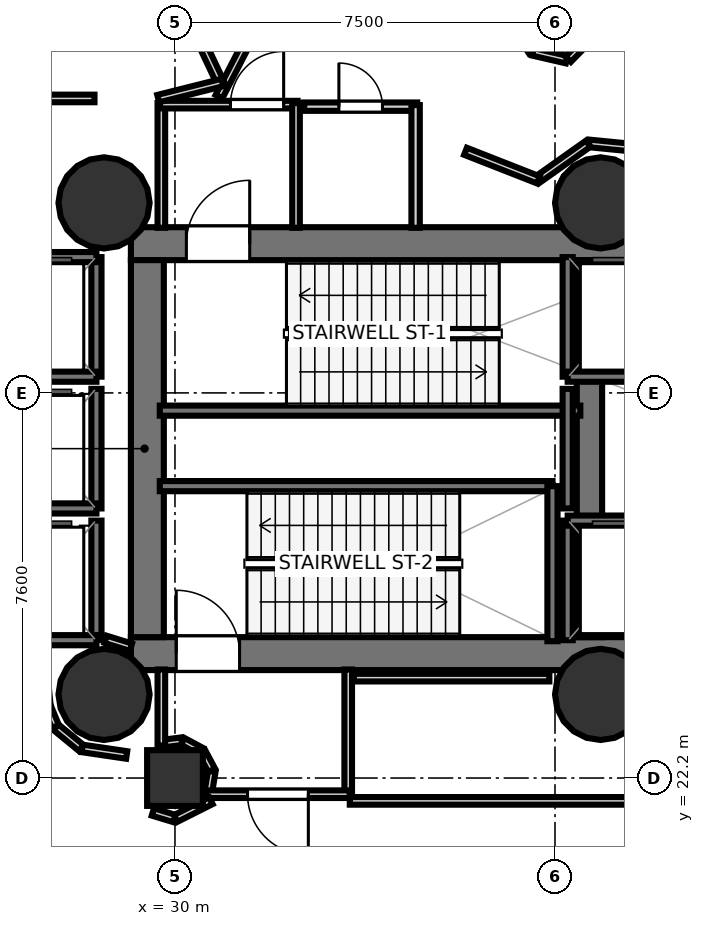
"""IFC4 building model, lengths in metres.
Left out: names, types, materials, properties, quantities, classifications, styles, units other than length and angle.
Written with IfcOpenShell. Run it as: python <this file> out.ifc"""

import sys

from ifc_helpers import new_model, si_unit, direction, frame, frame_2d, origin, origin_2d, place, context, subcontext, project, spatial, rectangle, hollow_circle, extrude, element, fill, save


model = new_model("IFC4")
c1 = context("Model", 3, precision=1e-05, world=origin(), true_north=direction((0.0, 1.0)))
c2 = subcontext(c1, "Body", "Model", "MODEL_VIEW")
j1 = project(units=[si_unit("LENGTHUNIT", "METRE"), si_unit("PLANEANGLEUNIT", "RADIAN")], contexts=[c1])
p1 = place(None, origin())
s1 = spatial("IfcSite", under=j1, at=p1, CompositionType="ELEMENT")
p2 = place(p1, origin())
s2 = spatial("IfcBuilding", under=s1, at=p2, CompositionType="ELEMENT")
p3 = place(p2, frame((0.0, 0.0, -5.6)))
s3 = spatial("IfcBuildingStorey", under=s2, at=p3, CompositionType="ELEMENT", Elevation=-5.6)
p4 = place(p3, frame((29.13, 32.745, 0.0), z_axis=(0.0, 0.0, 1.0), x_axis=(1.0, 0.0, 0.0)))
e1 = element("IfcWall", 1, at=p4, inside=s3, PredefinedType="SHEAR", context=c2, shape_type="SweptSolid", body=[
    extrude(rectangle(XDim=10.72, YDim=0.65, at=frame_2d((5.36, 0.0))), origin(), (0.0, 0.0, 1.0), 5.3),
])
p5 = place(p4, frame((1.095, 0.0, 0.0)))
e2 = element("IfcOpeningElement", 2, at=p5, cuts=e1, PredefinedType="OPENING", context=c2, shape_type="SweptSolid", body=[
    extrude(rectangle(XDim=1.25, YDim=2.15, at=frame_2d((0.625, 1.075))), frame((0.0, 0.335, 0.0), z_axis=(0.0, -1.0, 0.0), x_axis=(1.0, 0.0, 0.0)), (0.0, 0.0, 1.0), 0.67),
])
p6 = place(p3, frame((29.13, 24.655, 0.0), z_axis=(0.0, 0.0, 1.0), x_axis=(1.0, 0.0, 0.0)))
e3 = element("IfcWall", 3, at=p6, inside=s3, PredefinedType="SHEAR", context=c2, shape_type="SweptSolid", body=[
    extrude(rectangle(XDim=10.72, YDim=0.65, at=frame_2d((5.36, 0.0))), origin(), (0.0, 0.0, 1.0), 5.3),
])
p7 = place(p6, frame((0.895, 0.0, 0.0)))
e4 = element("IfcOpeningElement", 4, at=p7, cuts=e3, PredefinedType="OPENING", context=c2, shape_type="SweptSolid", body=[
    extrude(rectangle(XDim=1.25, YDim=2.15, at=frame_2d((0.625, 1.075))), frame((0.0, 0.335, 0.0), z_axis=(0.0, -1.0, 0.0), x_axis=(1.0, 0.0, 0.0)), (0.0, 0.0, 1.0), 0.67),
])
p8 = place(p3, frame((29.455, 24.98, 0.0), z_axis=(0.0, 0.0, 1.0), x_axis=(0.0, 1.0, 0.0)))
e5 = element("IfcWall", 5, at=p8, inside=s3, PredefinedType="SHEAR", context=c2, shape_type="SweptSolid", body=[
    extrude(rectangle(XDim=7.44, YDim=0.65, at=frame_2d((3.72, 0.0))), origin(), (0.0, 0.0, 1.0), 5.3),
])
p9 = place(p3, frame((38.18, 24.98, 0.0), z_axis=(0.0, 0.0, 1.0), x_axis=(0.0, 1.0, 0.0)))
e6 = element("IfcWall", 6, at=p9, inside=s3, PredefinedType="SHEAR", context=c2, shape_type="SweptSolid", body=[
    extrude(rectangle(XDim=7.44, YDim=0.5, at=frame_2d((3.72, 0.0))), origin(), (0.0, 0.0, 1.0), 5.3),
])
for number, where, z_axis, x_axis in (
    (7, (28.6, 33.55, 0.0), (0.0, 0.0, 1.0), (1.0, 0.0, 0.0)),
    (8, (28.6, 23.85, 0.0), (0.0, 0.0, 1.0), (1.0, 0.0, 0.0)),
    (9, (38.4, 33.55, 0.0), (0.0, 0.0, 1.0), (1.0, 0.0, 0.0)),
    (10, (38.4, 23.85, 0.0), (0.0, 0.0, 1.0), (1.0, 0.0, 0.0)),
):
    element("IfcColumn", number, at=place(p3, frame(where, z_axis=z_axis, x_axis=x_axis)), inside=s3, PredefinedType="COLUMN", context=c2, shape_type="SweptSolid", body=[
        extrude(hollow_circle(Radius=0.9, WallThickness=0.045, at=origin_2d()), origin(), (0.0, 0.0, 1.0), 5.6),
    ])
p10 = place(p3, frame((30.0, 22.2, 0.0), z_axis=(0.0, 0.0, 1.0), x_axis=(1.0, 0.0, 0.0)))
e11 = element("IfcColumn", 11, at=p10, inside=s3, PredefinedType="COLUMN", context=c2, shape_type="SweptSolid", body=[
    extrude(rectangle(XDim=1.1, YDim=1.1, at=origin_2d()), origin(), (0.0, 0.0, 1.0), 5.6),
])
p11 = place(p3, frame((29.7, 29.45, 0.0), z_axis=(0.0, 0.0, 1.0), x_axis=(1.0, 0.0, 0.0)))
e12 = element("IfcWall", 12, at=p11, inside=s3, PredefinedType="SOLIDWALL", context=c2, shape_type="SweptSolid", body=[
    extrude(rectangle(XDim=8.3, YDim=0.2, at=frame_2d((4.15, 0.0))), origin(), (0.0, 0.0, 1.0), 5.3),
])
p12 = place(p3, frame((29.7, 27.96, 0.0), z_axis=(0.0, 0.0, 1.0), x_axis=(1.0, 0.0, 0.0)))
e13 = element("IfcWall", 13, at=p12, inside=s3, PredefinedType="SOLIDWALL", context=c2, shape_type="SweptSolid", body=[
    extrude(rectangle(XDim=7.75, YDim=0.2, at=frame_2d((3.875, 0.0))), origin(), (0.0, 0.0, 1.0), 5.3),
])
p13 = place(p3, frame((37.45, 24.9, 0.0), z_axis=(0.0, 0.0, 1.0), x_axis=(0.0, 1.0, 0.0)))
e14 = element("IfcWall", 14, at=p13, inside=s3, PredefinedType="SOLIDWALL", context=c2, shape_type="SweptSolid", body=[
    extrude(rectangle(XDim=3.06, YDim=0.2, at=frame_2d((1.53, 0.0))), origin(), (0.0, 0.0, 1.0), 5.3),
])
p14 = place(p3, frame((37.75, 30.12, 0.0), z_axis=(0.0, 0.0, 1.0), x_axis=(0.0, 1.0, 0.0)))
e15 = element("IfcWall", 15, at=p14, inside=s3, PredefinedType="SOLIDWALL", context=c2, shape_type="SweptSolid", body=[
    extrude(rectangle(XDim=2.36, YDim=0.2, at=frame_2d((1.18, 0.0))), origin(), (0.0, 0.0, 1.0), 5.3),
])
p15 = place(p3, frame((37.75, 30.12, 0.0), z_axis=(0.0, 0.0, 1.0), x_axis=(1.0, 0.0, 0.0)))
e16 = element("IfcWall", 16, at=p15, inside=s3, PredefinedType="SOLIDWALL", context=c2, shape_type="SweptSolid", body=[
    extrude(rectangle(XDim=2.1, YDim=0.2, at=frame_2d((1.05, 0.0))), origin(), (0.0, 0.0, 1.0), 5.3),
])
p16 = place(p3, frame((37.75, 24.92, 0.0), z_axis=(0.0, 0.0, 1.0), x_axis=(0.0, 1.0, 0.0)))
e17 = element("IfcWall", 17, at=p16, inside=s3, PredefinedType="SOLIDWALL", context=c2, shape_type="SweptSolid", body=[
    extrude(rectangle(XDim=2.36, YDim=0.2, at=frame_2d((1.18, 0.0))), origin(), (0.0, 0.0, 1.0), 5.3),
])
p17 = place(p3, frame((37.75, 27.28, 0.0), z_axis=(0.0, 0.0, 1.0), x_axis=(1.0, 0.0, 0.0)))
e18 = element("IfcWall", 18, at=p17, inside=s3, PredefinedType="SOLIDWALL", context=c2, shape_type="SweptSolid", body=[
    extrude(rectangle(XDim=2.1, YDim=0.2, at=frame_2d((1.05, 0.0))), origin(), (0.0, 0.0, 1.0), 5.3),
])
p18 = place(p3, frame((28.45, 30.12, 0.0), z_axis=(0.0, 0.0, 1.0), x_axis=(0.0, 1.0, 0.0)))
e19 = element("IfcWall", 19, at=p18, inside=s3, PredefinedType="SOLIDWALL", context=c2, shape_type="SweptSolid", body=[
    extrude(rectangle(XDim=2.36, YDim=0.2, at=frame_2d((1.18, 0.0))), origin(), (0.0, 0.0, 1.0), 5.3),
])
for number, where, z_axis, x_axis in (
    (20, (26.35, 32.48, 0.0), (0.0, 0.0, 1.0), (1.0, 0.0, 0.0)),
    (21, (26.35, 30.12, 0.0), (0.0, 0.0, 1.0), (1.0, 0.0, 0.0)),
):
    element("IfcWall", number, at=place(p3, frame(where, z_axis=z_axis, x_axis=x_axis)), inside=s3, PredefinedType="SOLIDWALL", context=c2, shape_type="SweptSolid", body=[
        extrude(rectangle(XDim=2.1, YDim=0.2, at=frame_2d((1.05, 0.0))), origin(), (0.0, 0.0, 1.0), 5.3),
    ])
p19 = place(p3, frame((28.45, 27.52, 0.0), z_axis=(0.0, 0.0, 1.0), x_axis=(0.0, 1.0, 0.0)))
e22 = element("IfcWall", 22, at=p19, inside=s3, PredefinedType="SOLIDWALL", context=c2, shape_type="SweptSolid", body=[
    extrude(rectangle(XDim=2.36, YDim=0.2, at=frame_2d((1.18, 0.0))), origin(), (0.0, 0.0, 1.0), 5.3),
])
p20 = place(p3, frame((26.35, 27.52, 0.0), z_axis=(0.0, 0.0, 1.0), x_axis=(1.0, 0.0, 0.0)))
e23 = element("IfcWall", 23, at=p20, inside=s3, PredefinedType="SOLIDWALL", context=c2, shape_type="SweptSolid", body=[
    extrude(rectangle(XDim=2.1, YDim=0.2, at=frame_2d((1.05, 0.0))), origin(), (0.0, 0.0, 1.0), 5.3),
])
p21 = place(p3, frame((28.45, 24.92, 0.0), z_axis=(0.0, 0.0, 1.0), x_axis=(0.0, 1.0, 0.0)))
e24 = element("IfcWall", 24, at=p21, inside=s3, PredefinedType="SOLIDWALL", context=c2, shape_type="SweptSolid", body=[
    extrude(rectangle(XDim=2.36, YDim=0.2, at=frame_2d((1.18, 0.0))), origin(), (0.0, 0.0, 1.0), 5.3),
])
p22 = place(p3, frame((26.35, 24.92, 0.0), z_axis=(0.0, 0.0, 1.0), x_axis=(1.0, 0.0, 0.0)))
e25 = element("IfcWall", 25, at=p22, inside=s3, PredefinedType="SOLIDWALL", context=c2, shape_type="SweptSolid", body=[
    extrude(rectangle(XDim=2.1, YDim=0.2, at=frame_2d((1.05, 0.0))), origin(), (0.0, 0.0, 1.0), 5.3),
])
p23 = place(p3, frame((37.75, 27.52, 0.0), z_axis=(0.0, 0.0, 1.0), x_axis=(0.0, 1.0, 0.0)))
e26 = element("IfcWall", 26, at=p23, inside=s3, PredefinedType="SOLIDWALL", context=c2, shape_type="SweptSolid", body=[
    extrude(rectangle(XDim=2.36, YDim=0.2, at=frame_2d((1.18, 0.0))), origin(), (0.0, 0.0, 1.0), 5.3),
])
p24 = place(p3, frame((29.731, 33.058, 0.0), z_axis=(0.0, 0.0, 1.0), x_axis=(0.0, 1.0, 0.0)))
e27 = element("IfcWall", 27, at=p24, inside=s3, PredefinedType="PARTITIONING", context=c2, shape_type="SweptSolid", body=[
    extrude(rectangle(XDim=2.462, YDim=0.15, at=frame_2d((1.231, 0.0))), origin(), (0.0, 0.0, 1.0), 4.62),
])
p25 = place(p3, frame((29.7, 35.489, 0.0), z_axis=(0.0, 0.0, 1.0), x_axis=(1.0, 0.0, 0.0)))
e28 = element("IfcWall", 28, at=p25, inside=s3, PredefinedType="PARTITIONING", context=c2, shape_type="SweptSolid", body=[
    extrude(rectangle(XDim=2.72, YDim=0.15, at=frame_2d((1.36, 0.0))), origin(), (0.0, 0.0, 1.0), 4.62),
])
p26 = place(p25, frame((1.395, 0.0, 0.0)))
e29 = element("IfcOpeningElement", 29, at=p26, cuts=e28, PredefinedType="OPENING", context=c2, shape_type="SweptSolid", body=[
    extrude(rectangle(XDim=1.05, YDim=2.15, at=frame_2d((0.525, 1.075))), frame((0.0, 0.085, 0.0), z_axis=(0.0, -1.0, 0.0), x_axis=(1.0, 0.0, 0.0)), (0.0, 0.0, 1.0), 0.17),
])
p27 = place(p3, frame((32.389, 35.52, 0.0), z_axis=(0.0, 0.0, 1.0), x_axis=(0.0, -1.0, 0.0)))
e30 = element("IfcWall", 30, at=p27, inside=s3, PredefinedType="PARTITIONING", context=c2, shape_type="SweptSolid", body=[
    extrude(rectangle(XDim=2.462, YDim=0.15, at=frame_2d((1.231, 0.0))), origin(), (0.0, 0.0, 1.0), 4.62),
])
p28 = place(p3, frame((30.645, 21.845, 0.0), z_axis=(0.0, 0.0, 1.0), x_axis=(0.16559769087, 0.986193391165, 0.0)))
e31 = element("IfcWall", 31, at=p28, inside=s3, PredefinedType="PARTITIONING", context=c2, shape_type="SweptSolid", body=[
    extrude(rectangle(XDim=0.495, YDim=0.15, at=frame_2d((0.248, 0.0))), origin(), (0.0, 0.0, 1.0), 4.478),
])
p29 = place(p3, frame((30.724, 22.353, 0.0), z_axis=(0.0, 0.0, 1.0), x_axis=(-0.471202615726, 0.882024996773, 0.0)))
e32 = element("IfcWall", 32, at=p29, inside=s3, PredefinedType="PARTITIONING", context=c2, shape_type="SweptSolid", body=[
    extrude(rectangle(XDim=0.412, YDim=0.15, at=frame_2d((0.206, 0.0))), origin(), (0.0, 0.0, 1.0), 4.478),
])
p30 = place(p3, frame((30.517, 22.729, 0.0), z_axis=(0.0, 0.0, 1.0), x_axis=(-0.882139655073, 0.470987928665, 0.0)))
e33 = element("IfcWall", 33, at=p30, inside=s3, PredefinedType="PARTITIONING", context=c2, shape_type="SweptSolid", body=[
    extrude(rectangle(XDim=0.412, YDim=0.15, at=frame_2d((0.206, 0.0))), origin(), (0.0, 0.0, 1.0), 4.62),
])
p31 = place(p3, frame((30.135, 22.927, 0.0), z_axis=(0.0, 0.0, 1.0), x_axis=(-0.992106976416, -0.125394367286, 0.0)))
e34 = element("IfcWall", 34, at=p31, inside=s3, PredefinedType="PARTITIONING", context=c2, shape_type="SweptSolid", body=[
    extrude(rectangle(XDim=0.442, YDim=0.15, at=frame_2d((0.221, 0.0))), origin(), (0.0, 0.0, 1.0), 4.62),
])
p32 = place(p3, frame((29.731, 22.841, 0.0), z_axis=(0.0, 0.0, 1.0), x_axis=(0.0, 1.0, 0.0)))
e35 = element("IfcWall", 35, at=p32, inside=s3, PredefinedType="PARTITIONING", context=c2, shape_type="SweptSolid", body=[
    extrude(rectangle(XDim=1.501, YDim=0.15, at=frame_2d((0.75, 0.0))), origin(), (0.0, 0.0, 1.0), 4.62),
])
p33 = place(p3, frame((33.419, 24.342, 0.0), z_axis=(0.0, 0.0, 1.0), x_axis=(0.0, -1.0, 0.0)))
e36 = element("IfcWall", 36, at=p33, inside=s3, PredefinedType="PARTITIONING", context=c2, shape_type="SweptSolid", body=[
    extrude(rectangle(XDim=2.492, YDim=0.15, at=frame_2d((1.246, 0.0))), origin(), (0.0, 0.0, 1.0), 4.478),
])
p34 = place(p3, frame((33.45, 21.881, 0.0), z_axis=(0.0, 0.0, 1.0), x_axis=(-1.0, 0.0, 0.0)))
e37 = element("IfcWall", 37, at=p34, inside=s3, PredefinedType="PARTITIONING", context=c2, shape_type="SweptSolid", body=[
    extrude(rectangle(XDim=2.836, YDim=0.15, at=frame_2d((1.418, 0.0))), origin(), (0.0, 0.0, 1.0), 4.62),
])
p35 = place(p34, frame((0.818, 0.0, 0.0)))
e38 = element("IfcOpeningElement", 38, at=p35, cuts=e37, PredefinedType="OPENING", context=c2, shape_type="SweptSolid", body=[
    extrude(rectangle(XDim=1.2, YDim=2.15, at=frame_2d((0.6, 1.075))), frame((0.0, 0.085, 0.0), z_axis=(0.0, -1.0, 0.0), x_axis=(1.0, 0.0, 0.0)), (0.0, 0.0, 1.0), 0.17),
])
p36 = place(p3, frame((32.55, 35.449, 0.0), z_axis=(0.0, 0.0, 1.0), x_axis=(1.0, 0.0, 0.0)))
e39 = element("IfcWall", 39, at=p36, inside=s3, PredefinedType="PLUMBINGWALL", context=c2, shape_type="SweptSolid", body=[
    extrude(rectangle(XDim=2.23, YDim=0.165, at=frame_2d((1.115, 0.0))), origin(), (0.0, 0.0, 1.0), 4.62),
])
p37 = place(p36, frame((0.685, 0.0, 0.0)))
e40 = element("IfcOpeningElement", 40, at=p37, cuts=e39, PredefinedType="OPENING", context=c2, shape_type="SweptSolid", body=[
    extrude(rectangle(XDim=0.86, YDim=2.05, at=frame_2d((0.43, 1.025))), frame((0.0, 0.093, 0.0), z_axis=(0.0, -1.0, 0.0), x_axis=(1.0, 0.0, 0.0)), (0.0, 0.0, 1.0), 0.185),
])
p38 = place(p3, frame((34.749, 35.48, 0.0), z_axis=(0.0, 0.0, 1.0), x_axis=(0.0, -1.0, 0.0)))
e41 = element("IfcWall", 41, at=p38, inside=s3, PredefinedType="PLUMBINGWALL", context=c2, shape_type="SweptSolid", body=[
    extrude(rectangle(XDim=2.422, YDim=0.165, at=frame_2d((1.211, 0.0))), origin(), (0.0, 0.0, 1.0), 4.62),
])
p39 = place(p3, frame((29.13, 24.782, 0.0), z_axis=(0.0, 0.0, 1.0), x_axis=(-0.955000482512, 0.296604245422, 0.0)))
e42 = element("IfcWall", 42, at=p39, inside=s3, PredefinedType="PARTITIONING", context=c2, shape_type="SweptSolid", body=[
    extrude(rectangle(XDim=0.524, YDim=0.15, at=frame_2d((0.262, 0.0))), origin(), (0.0, 0.0, 1.0), 4.62),
])
p40 = place(p3, frame((37.389, 24.181, 0.0), z_axis=(0.0, 0.0, 1.0), x_axis=(-1.0, 0.0, 0.0)))
e43 = element("IfcWall", 43, at=p40, inside=s3, PredefinedType="PARTITIONING", context=c2, shape_type="SweptSolid", body=[
    extrude(rectangle(XDim=3.859, YDim=0.15, at=frame_2d((1.929, 0.0))), origin(), (0.0, 0.0, 1.0), 4.62),
])
p41 = place(p3, frame((36.719, 37.033, 0.0), z_axis=(0.0, 0.0, 1.0), x_axis=(0.555369021078, -0.831604022613, 0.0)))
e44 = element("IfcWall", 44, at=p41, inside=s3, PredefinedType="PARTITIONING", context=c2, shape_type="SweptSolid", body=[
    extrude(rectangle(XDim=0.59, YDim=0.15, at=frame_2d((0.295, 0.0))), origin(), (0.0, 0.0, 1.0), 4.62),
])
p42 = place(p3, frame((37.065, 36.53, 0.0), z_axis=(0.0, 0.0, 1.0), x_axis=(0.974571578147, -0.224076413457, 0.0)))
e45 = element("IfcWall", 45, at=p42, inside=s3, PredefinedType="PARTITIONING", context=c2, shape_type="SweptSolid", body=[
    extrude(rectangle(XDim=0.683, YDim=0.15, at=frame_2d((0.342, 0.0))), origin(), (0.0, 0.0, 1.0), 4.62),
])
p43 = place(p3, frame((37.76, 36.385, 0.0), z_axis=(0.0, 0.0, 1.0), x_axis=(0.700866130058, 0.713292834492, 0.0)))
e46 = element("IfcWall", 46, at=p43, inside=s3, PredefinedType="PARTITIONING", context=c2, shape_type="SweptSolid", body=[
    extrude(rectangle(XDim=0.884, YDim=0.15, at=frame_2d((0.442, 0.0))), origin(), (0.0, 0.0, 1.0), 4.62),
])
p44 = place(p3, frame((39.676, 34.575, 0.0), z_axis=(0.0, 0.0, 1.0), x_axis=(-0.995186799139, 0.097996095944, 0.0)))
e47 = element("IfcWall", 47, at=p44, inside=s3, PredefinedType="PARTITIONING", context=c2, shape_type="SweptSolid", body=[
    extrude(rectangle(XDim=1.507, YDim=0.15, at=frame_2d((0.754, 0.0))), origin(), (0.0, 0.0, 1.0), 4.62),
])
p45 = place(p3, frame((38.155, 34.718, 0.0), z_axis=(0.0, 0.0, 1.0), x_axis=(-0.815749774427, -0.578404966717, 0.0)))
e48 = element("IfcWall", 48, at=p45, inside=s3, PredefinedType="PARTITIONING", context=c2, shape_type="SweptSolid", body=[
    extrude(rectangle(XDim=1.24, YDim=0.15, at=frame_2d((0.62, 0.0))), origin(), (0.0, 0.0, 1.0), 4.62),
])
p46 = place(p3, frame((37.172, 34.004, 0.0), z_axis=(0.0, 0.0, 1.0), x_axis=(-0.930972145639, 0.36509021357, 0.0)))
e49 = element("IfcWall", 49, at=p46, inside=s3, PredefinedType="PARTITIONING", context=c2, shape_type="SweptSolid", body=[
    extrude(rectangle(XDim=1.545, YDim=0.15, at=frame_2d((0.773, 0.0))), origin(), (0.0, 0.0, 1.0), 4.62),
])
p47 = place(p3, frame((30.868, 35.646, 0.0), z_axis=(0.0, 0.0, 1.0), x_axis=(0.457713605207, 0.889099688229, 0.0)))
e50 = element("IfcWall", 50, at=p47, inside=s3, PredefinedType="PARTITIONING", context=c2, shape_type="SweptSolid", body=[
    extrude(rectangle(XDim=1.901, YDim=0.15, at=frame_2d((0.951, 0.0))), origin(), (0.0, 0.0, 1.0), 4.62),
])
p48 = place(p3, frame((30.157, 37.487, 0.0), z_axis=(0.0, 0.0, 1.0), x_axis=(0.427353044203, -0.904084827663, 0.0)))
e51 = element("IfcWall", 51, at=p48, inside=s3, PredefinedType="PARTITIONING", context=c2, shape_type="SweptSolid", body=[
    extrude(rectangle(XDim=1.775, YDim=0.15, at=frame_2d((0.887, 0.0))), origin(), (0.0, 0.0, 1.0), 4.62),
])
p49 = place(p3, frame((30.937, 35.926, 0.0), z_axis=(0.0, 0.0, 1.0), x_axis=(-0.969933389944, -0.243370538628, 0.0)))
e52 = element("IfcWall", 52, at=p49, inside=s3, PredefinedType="PARTITIONING", context=c2, shape_type="SweptSolid", body=[
    extrude(rectangle(XDim=1.307, YDim=0.15, at=frame_2d((0.654, 0.0))), origin(), (0.0, 0.0, 1.0), 4.62),
])
p50 = place(p3, frame((28.411, 35.611, 0.0), z_axis=(0.0, 0.0, 1.0), x_axis=(-1.0, 0.0, 0.0)))
e53 = element("IfcWall", 53, at=p50, inside=s3, PredefinedType="PARTITIONING", context=c2, shape_type="SweptSolid", body=[
    extrude(rectangle(XDim=1.861, YDim=0.15, at=frame_2d((0.931, 0.0))), origin(), (0.0, 0.0, 1.0), 4.62),
])
p51 = place(p3, frame((27.473, 23.62, 0.0), z_axis=(0.0, 0.0, 1.0), x_axis=(0.382631351728, -0.923901103298, 0.0)))
e54 = element("IfcWall", 54, at=p51, inside=s3, PredefinedType="PARTITIONING", context=c2, shape_type="SweptSolid", body=[
    extrude(rectangle(XDim=0.437, YDim=0.15, at=frame_2d((0.219, 0.0))), origin(), (0.0, 0.0, 1.0), 4.62),
])
p52 = place(p3, frame((27.649, 23.204, 0.0), z_axis=(0.0, 0.0, 1.0), x_axis=(0.772818338666, -0.634627304346, 0.0)))
e55 = element("IfcWall", 55, at=p52, inside=s3, PredefinedType="PARTITIONING", context=c2, shape_type="SweptSolid", body=[
    extrude(rectangle(XDim=0.65, YDim=0.15, at=frame_2d((0.325, 0.0))), origin(), (0.0, 0.0, 1.0), 4.62),
])
p53 = place(p3, frame((28.167, 22.785, 0.0), z_axis=(0.0, 0.0, 1.0), x_axis=(0.989291662385, -0.145952069991, 0.0)))
e56 = element("IfcWall", 56, at=p53, inside=s3, PredefinedType="PARTITIONING", context=c2, shape_type="SweptSolid", body=[
    extrude(rectangle(XDim=0.89, YDim=0.15, at=frame_2d((0.445, 0.0))), origin(), (0.0, 0.0, 1.0), 4.62),
])
p54 = place(p3, frame((29.563, 21.53, 0.0), z_axis=(0.0, 0.0, 1.0), x_axis=(0.957010621041, -0.290052876583, 0.0)))
e57 = element("IfcWall", 57, at=p54, inside=s3, PredefinedType="PARTITIONING", context=c2, shape_type="SweptSolid", body=[
    extrude(rectangle(XDim=0.447, YDim=0.15, at=frame_2d((0.224, 0.0))), origin(), (0.0, 0.0, 1.0), 4.62),
])
p55 = place(p3, frame((30.014, 21.402, 0.0), z_axis=(0.0, 0.0, 1.0), x_axis=(0.893548213857, 0.448967247706, 0.0)))
e58 = element("IfcWall", 58, at=p55, inside=s3, PredefinedType="PARTITIONING", context=c2, shape_type="SweptSolid", body=[
    extrude(rectangle(XDim=0.779, YDim=0.15, at=frame_2d((0.39, 0.0))), origin(), (0.0, 0.0, 1.0), 4.62),
])
p56 = place(p3, frame((33.45, 21.749, 0.0), z_axis=(0.0, 0.0, 1.0), x_axis=(1.0, 0.0, 0.0)))
e59 = element("IfcWall", 59, at=p56, inside=s3, PredefinedType="PARTITIONING", context=c2, shape_type="SweptSolid", body=[
    extrude(rectangle(XDim=6.43, YDim=0.15, at=frame_2d((3.215, 0.0))), origin(), (0.0, 0.0, 1.0), 4.62),
])
p57 = place(p5, origin())
e60 = element("IfcDoor", 60, at=p57, inside=s3, OperationType="SINGLE_SWING_RIGHT", PredefinedType="DOOR", context=c2, shape_type="SweptSolid", body=[
    extrude(rectangle(XDim=1.25, YDim=2.15, at=frame_2d((0.625, 1.075))), frame((0.0, 0.025, 0.0), z_axis=(0.0, -1.0, 0.0), x_axis=(1.0, 0.0, 0.0)), (0.0, 0.0, 1.0), 0.05),
])
fill(e2, e60)
p58 = place(p7, origin())
e61 = element("IfcDoor", 61, at=p58, inside=s3, OperationType="SINGLE_SWING_LEFT", PredefinedType="DOOR", context=c2, shape_type="SweptSolid", body=[
    extrude(rectangle(XDim=1.25, YDim=2.15, at=frame_2d((0.625, 1.075))), frame((0.0, 0.025, 0.0), z_axis=(0.0, -1.0, 0.0), x_axis=(1.0, 0.0, 0.0)), (0.0, 0.0, 1.0), 0.05),
])
fill(e4, e61)
p59 = place(p26, origin())
e62 = element("IfcDoor", 62, at=p59, inside=s3, OperationType="SINGLE_SWING_RIGHT", PredefinedType="DOOR", context=c2, shape_type="SweptSolid", body=[
    extrude(rectangle(XDim=1.05, YDim=2.15, at=frame_2d((0.525, 1.075))), frame((0.0, 0.025, 0.0), z_axis=(0.0, -1.0, 0.0), x_axis=(1.0, 0.0, 0.0)), (0.0, 0.0, 1.0), 0.05),
])
fill(e29, e62)
p60 = place(p35, origin())
e63 = element("IfcDoor", 63, at=p60, inside=s3, OperationType="SINGLE_SWING_LEFT", PredefinedType="DOOR", context=c2, shape_type="SweptSolid", body=[
    extrude(rectangle(XDim=1.2, YDim=2.15, at=frame_2d((0.6, 1.075))), frame((0.0, 0.025, 0.0), z_axis=(0.0, -1.0, 0.0), x_axis=(1.0, 0.0, 0.0)), (0.0, 0.0, 1.0), 0.05),
])
fill(e38, e63)
p61 = place(p37, origin())
e64 = element("IfcDoor", 64, at=p61, inside=s3, OperationType="SINGLE_SWING_LEFT", PredefinedType="DOOR", context=c2, shape_type="SweptSolid", body=[
    extrude(rectangle(XDim=0.86, YDim=2.05, at=frame_2d((0.43, 1.025))), frame((0.0, 0.025, 0.0), z_axis=(0.0, -1.0, 0.0), x_axis=(1.0, 0.0, 0.0)), (0.0, 0.0, 1.0), 0.05),
])
fill(e40, e64)
save(model, sys.argv[1])
